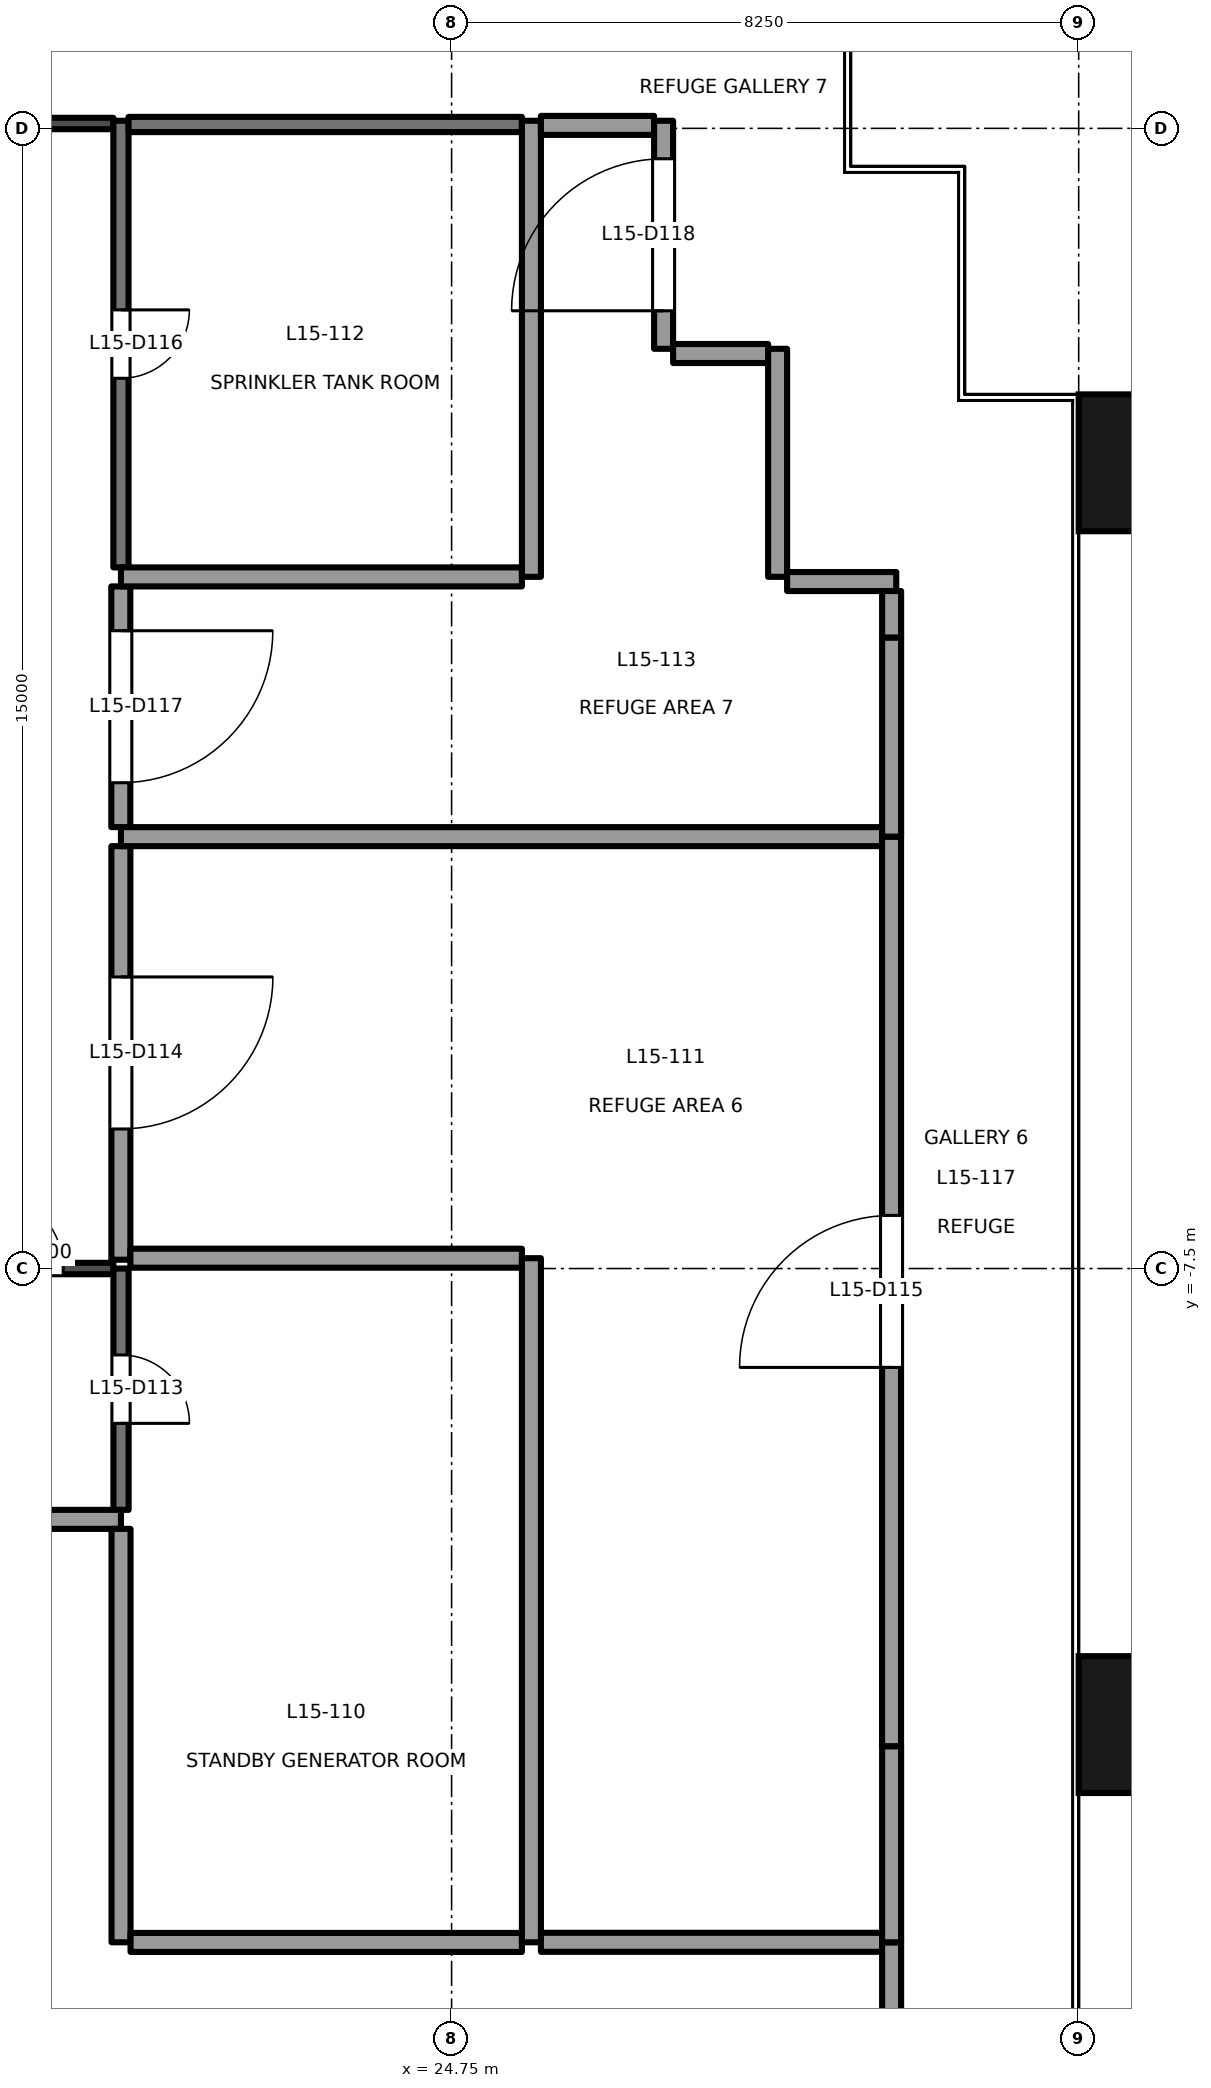
"""IFC4 building model, lengths in metres.
Left out: names, types, materials, properties, quantities, classifications, styles, units other than length and angle.
Written with IfcOpenShell. Run it as: python <this file> out.ifc"""

import sys

from ifc_helpers import new_model, si_unit, direction, frame, frame_2d, origin, origin_2d, place, context, subcontext, project, spatial, rectangle, extrude, element, fill, save


model = new_model("IFC4")
c1 = context("Model", 3, precision=1e-05, world=origin(), true_north=direction((0.0, 1.0)))
c2 = subcontext(c1, "Body", "Model", "MODEL_VIEW")
j1 = project(units=[si_unit("LENGTHUNIT", "METRE"), si_unit("PLANEANGLEUNIT", "RADIAN")], contexts=[c1])
p1 = place(None, origin())
s1 = spatial("IfcSite", under=j1, at=p1, CompositionType="ELEMENT")
p2 = place(p1, origin())
s2 = spatial("IfcBuilding", under=s1, at=p2, CompositionType="ELEMENT")
p3 = place(p2, frame((0.0, 0.0, 69.3)))
s3 = spatial("IfcBuildingStorey", under=s2, at=p3, CompositionType="ELEMENT", Elevation=69.3)
for number, where, z_axis, x_axis in (
    (1, (33.9, -13.5, -0.2), (0.0, 0.0, 1.0), (0.0, 1.0, 0.0)),
    (2, (33.9, 3.1, -0.2), (0.0, 0.0, 1.0), (0.0, 1.0, 0.0)),
):
    element("IfcColumn", number, at=place(p3, frame(where, z_axis=z_axis, x_axis=x_axis)), inside=s3, PredefinedType="COLUMN", context=c2, shape_type="SweptSolid", body=[
        extrude(rectangle(XDim=1.8, YDim=1.8, at=origin_2d()), origin(), (0.0, 0.0, 1.0), 5.0),
    ])
p4 = place(p3, frame((17.98, -7.5, 0.0), z_axis=(0.0, 0.0, 1.0), x_axis=(1.0, 0.0, 0.0)))
e3 = element("IfcWall", 3, at=p4, inside=s3, PredefinedType="PARTITIONING", context=c2, shape_type="SweptSolid", body=[
    extrude(rectangle(XDim=2.32, YDim=0.15, at=frame_2d((1.16, 0.0))), origin(), (0.0, 0.0, 1.0), 2.15),
])
p5 = place(p4, frame((0.66, 0.0, 0.0)))
e4 = element("IfcOpeningElement", 4, at=p5, cuts=e3, PredefinedType="OPENING", context=c2, shape_type="SweptSolid", body=[
    extrude(rectangle(XDim=1.0, YDim=2.1, at=frame_2d((0.5, 1.05))), frame((0.0, 0.085, 0.0), z_axis=(0.0, -1.0, 0.0), x_axis=(1.0, 0.0, 0.0)), (0.0, 0.0, 1.0), 0.171),
])
p6 = place(p3, frame((20.4, -10.8, 0.0), z_axis=(0.0, 0.0, 1.0), x_axis=(-1.0, 0.0, 0.0)))
e5 = element("IfcWall", 5, at=p6, inside=s3, PredefinedType="PARTITIONING", context=c2, shape_type="SweptSolid", body=[
    extrude(rectangle(XDim=17.275, YDim=0.25, at=frame_2d((8.637, 0.0))), origin(), (0.0, 0.0, 1.0), 2.15),
])
p7 = place(p6, frame((7.638, 0.0, 0.0)))
e6 = element("IfcOpeningElement", 6, at=p7, cuts=e5, PredefinedType="OPENING", context=c2, shape_type="SweptSolid", body=[
    extrude(rectangle(XDim=2.0, YDim=2.1, at=frame_2d((1.0, 1.05))), frame((0.0, 0.135, 0.0), z_axis=(0.0, -1.0, 0.0), x_axis=(1.0, 0.0, 0.0)), (0.0, 0.0, 1.0), 0.271),
])
p8 = place(p3, frame((20.401, -7.5, 0.0), z_axis=(0.0, 0.0, 1.0), x_axis=(0.0, -1.0, 0.0)))
e7 = element("IfcWall", 7, at=p8, inside=s3, PredefinedType="PARTITIONING", context=c2, shape_type="SweptSolid", body=[
    extrude(rectangle(XDim=3.175, YDim=0.2, at=frame_2d((1.587, 0.0))), origin(), (0.0, 0.0, 1.0), 4.2),
])
p9 = place(p8, frame((1.137, 0.0, 0.0)))
e8 = element("IfcOpeningElement", 8, at=p9, cuts=e7, PredefinedType="OPENING", context=c2, shape_type="SweptSolid", body=[
    extrude(rectangle(XDim=0.9, YDim=2.1, at=frame_2d((0.45, 1.05))), frame((0.0, 0.111, 0.0), z_axis=(0.0, -1.0, 0.0), x_axis=(1.0, 0.0, 0.0)), (0.0, 0.0, 1.0), 0.221),
])
p10 = place(p3, frame((20.399, -1.943, 0.0), z_axis=(0.0, 0.0, 1.0), x_axis=(0.0, -1.0, 0.0)))
e9 = element("IfcWall", 9, at=p10, inside=s3, PredefinedType="PARTITIONING", context=c2, shape_type="SweptSolid", body=[
    extrude(rectangle(XDim=5.441, YDim=0.25, at=frame_2d((2.72, 0.0))), origin(), (0.0, 0.0, 1.0), 4.2),
])
p11 = place(p10, frame((1.721, 0.0, 0.0)))
e10 = element("IfcOpeningElement", 10, at=p11, cuts=e9, PredefinedType="OPENING", context=c2, shape_type="SweptSolid", body=[
    extrude(rectangle(XDim=2.0, YDim=2.1, at=frame_2d((1.0, 1.05))), frame((0.0, 0.135, 0.0), z_axis=(0.0, -1.0, 0.0), x_axis=(1.0, 0.0, 0.0)), (0.0, 0.0, 1.0), 0.271),
])
p12 = place(p3, frame((20.4, 7.6, 0.0), z_axis=(0.0, 0.0, 1.0), x_axis=(0.0, -1.0, 0.0)))
e11 = element("IfcWall", 11, at=p12, inside=s3, PredefinedType="PARTITIONING", context=c2, shape_type="SweptSolid", body=[
    extrude(rectangle(XDim=5.876, YDim=0.2, at=frame_2d((2.938, 0.0))), origin(), (0.0, 0.0, 1.0), 3.9),
])
p13 = place(p12, frame((2.488, 0.0, 0.0)))
e12 = element("IfcOpeningElement", 12, at=p13, cuts=e11, PredefinedType="OPENING", context=c2, shape_type="SweptSolid", body=[
    extrude(rectangle(XDim=0.9, YDim=2.1, at=frame_2d((0.45, 1.05))), frame((0.0, 0.111, 0.0), z_axis=(0.0, -1.0, 0.0), x_axis=(1.0, 0.0, 0.0)), (0.0, 0.0, 1.0), 0.221),
])
p14 = place(p3, frame((20.398, 1.474, 0.0), z_axis=(0.0, 0.0, 1.0), x_axis=(0.0, -1.0, 0.0)))
e13 = element("IfcWall", 13, at=p14, inside=s3, PredefinedType="PARTITIONING", context=c2, shape_type="SweptSolid", body=[
    extrude(rectangle(XDim=3.167, YDim=0.25, at=frame_2d((1.583, 0.0))), origin(), (0.0, 0.0, 1.0), 4.2),
])
p15 = place(p14, frame((0.583, 0.0, 0.0)))
e14 = element("IfcOpeningElement", 14, at=p15, cuts=e13, PredefinedType="OPENING", context=c2, shape_type="SweptSolid", body=[
    extrude(rectangle(XDim=2.0, YDim=2.1, at=frame_2d((1.0, 1.05))), frame((0.0, 0.135, 0.0), z_axis=(0.0, -1.0, 0.0), x_axis=(1.0, 0.0, 0.0)), (0.0, 0.0, 1.0), 0.271),
])
p16 = place(p3, frame((-17.82, 7.564, 0.0), z_axis=(0.0, 0.0, 1.0), x_axis=(1.0, 0.0, 0.0)))
e15 = element("IfcWall", 15, at=p16, inside=s3, PredefinedType="PARTITIONING", context=c2, shape_type="SweptSolid", body=[
    extrude(rectangle(XDim=38.12, YDim=0.15, at=frame_2d((19.06, 0.0))), origin(), (0.0, 0.0, 1.0), 2.75),
])
p17 = place(p3, frame((20.401, -10.925, 0.0), z_axis=(0.0, 0.0, 1.0), x_axis=(0.0, -1.0, 0.0)))
e16 = element("IfcWall", 16, at=p17, inside=s3, PredefinedType="PARTITIONING", context=c2, shape_type="SweptSolid", body=[
    extrude(rectangle(XDim=5.439, YDim=0.25, at=frame_2d((2.719, 0.0))), origin(), (0.0, 0.0, 1.0), 4.0),
])
p18 = place(p3, frame((20.526, -16.366, 0.0), z_axis=(0.0, 0.0, 1.0), x_axis=(1.0, 0.0, 0.0)))
e17 = element("IfcWall", 17, at=p18, inside=s3, PredefinedType="PARTITIONING", context=c2, shape_type="SweptSolid", body=[
    extrude(rectangle(XDim=5.149, YDim=0.25, at=frame_2d((2.575, 0.0))), origin(), (0.0, 0.0, 1.0), 4.8),
])
p19 = place(p3, frame((25.925, -16.364, 0.0), z_axis=(0.0, 0.0, 1.0), x_axis=(1.0, 0.0, 0.0)))
e18 = element("IfcWall", 18, at=p19, inside=s3, PredefinedType="PARTITIONING", context=c2, shape_type="SweptSolid", body=[
    extrude(rectangle(XDim=4.489, YDim=0.25, at=frame_2d((2.245, 0.0))), origin(), (0.0, 0.0, 1.0), 4.8),
])
p20 = place(p3, frame((30.539, -16.364, 0.0), z_axis=(0.0, 0.0, 1.0), x_axis=(0.0, -1.0, 0.0)))
e19 = element("IfcWall", 19, at=p20, inside=s3, PredefinedType="PARTITIONING", context=c2, shape_type="SweptSolid", body=[
    extrude(rectangle(XDim=9.236, YDim=0.25, at=frame_2d((4.618, 0.0))), origin(), (0.0, 0.0, 1.0), 4.2),
])
p21 = place(p3, frame((20.524, -7.364, 0.0), z_axis=(0.0, 0.0, 1.0), x_axis=(1.0, 0.0, 0.0)))
e20 = element("IfcWall", 20, at=p21, inside=s3, PredefinedType="PARTITIONING", context=c2, shape_type="SweptSolid", body=[
    extrude(rectangle(XDim=5.151, YDim=0.25, at=frame_2d((2.576, 0.0))), origin(), (0.0, 0.0, 1.0), 4.8),
])
p22 = place(p3, frame((25.8, -7.364, 0.0), z_axis=(0.0, 0.0, 1.0), x_axis=(0.0, -1.0, 0.0)))
e21 = element("IfcWall", 21, at=p22, inside=s3, PredefinedType="PARTITIONING", context=c2, shape_type="SweptSolid", body=[
    extrude(rectangle(XDim=9.0, YDim=0.25, at=frame_2d((4.5, 0.0))), origin(), (0.0, 0.0, 1.0), 4.0),
])
p23 = place(p3, frame((20.4, -1.818, 0.0), z_axis=(0.0, 0.0, 1.0), x_axis=(1.0, 0.0, 0.0)))
e22 = element("IfcWall", 22, at=p23, inside=s3, PredefinedType="PARTITIONING", context=c2, shape_type="SweptSolid", body=[
    extrude(rectangle(XDim=10.013, YDim=0.25, at=frame_2d((5.007, 0.0))), origin(), (0.0, 0.0, 1.0), 4.8),
])
p24 = place(p3, frame((30.539, -13.784, 0.0), z_axis=(0.0, 0.0, 1.0), x_axis=(0.0, -1.0, 0.0)))
e23 = element("IfcWall", 23, at=p24, inside=s3, PredefinedType="PARTITIONING", context=c2, shape_type="SweptSolid", body=[
    extrude(rectangle(XDim=2.58, YDim=0.25, at=frame_2d((1.29, 0.0))), origin(), (0.0, 0.0, 1.0), 4.8),
])
p25 = place(p3, frame((30.538, -13.784, 0.0), z_axis=(0.0, 0.0, 1.0), x_axis=(0.0, 1.0, 0.0)))
e24 = element("IfcWall", 24, at=p25, inside=s3, PredefinedType="PARTITIONING", context=c2, shape_type="SweptSolid", body=[
    extrude(rectangle(XDim=11.966, YDim=0.25, at=frame_2d((5.983, 0.0))), origin(), (0.0, 0.0, 1.0), 4.0),
])
p26 = place(p25, frame((4.983, 0.0, 0.0)))
e25 = element("IfcOpeningElement", 25, at=p26, cuts=e24, PredefinedType="OPENING", context=c2, shape_type="SweptSolid", body=[
    extrude(rectangle(XDim=2.0, YDim=2.1, at=frame_2d((1.0, 1.05))), frame((0.0, 0.135, 0.0), z_axis=(0.0, -1.0, 0.0), x_axis=(1.0, 0.0, 0.0)), (0.0, 0.0, 1.0), 0.271),
])
p27 = place(p3, frame((25.675, 1.599, 0.0), z_axis=(0.0, 0.0, 1.0), x_axis=(-1.0, 0.0, 0.0)))
e26 = element("IfcWall", 26, at=p27, inside=s3, PredefinedType="PARTITIONING", context=c2, shape_type="SweptSolid", body=[
    extrude(rectangle(XDim=5.275, YDim=0.25, at=frame_2d((2.638, 0.0))), origin(), (0.0, 0.0, 1.0), 4.8),
])
p28 = place(p3, frame((25.8, 7.6, 0.0), z_axis=(0.0, 0.0, 1.0), x_axis=(0.0, -1.0, 0.0)))
e27 = element("IfcWall", 27, at=p28, inside=s3, PredefinedType="PARTITIONING", context=c2, shape_type="SweptSolid", body=[
    extrude(rectangle(XDim=6.0, YDim=0.25, at=frame_2d((3.0, 0.0))), origin(), (0.0, 0.0, 1.0), 3.9),
])
p29 = place(p3, frame((20.5, 7.551, 0.0), z_axis=(0.0, 0.0, 1.0), x_axis=(1.0, 0.0, 0.0)))
e28 = element("IfcWall", 28, at=p29, inside=s3, PredefinedType="PARTITIONING", context=c2, shape_type="SweptSolid", body=[
    extrude(rectangle(XDim=5.175, YDim=0.2, at=frame_2d((2.587, 0.0))), origin(), (0.0, 0.0, 1.0), 4.8),
])
p30 = place(p3, frame((30.539, 0.802, 0.0), z_axis=(0.0, 0.0, 1.0), x_axis=(0.0, -1.0, 0.0)))
e29 = element("IfcWall", 29, at=p30, inside=s3, PredefinedType="PARTITIONING", context=c2, shape_type="SweptSolid", body=[
    extrude(rectangle(XDim=2.62, YDim=0.25, at=frame_2d((1.31, 0.0))), origin(), (0.0, 0.0, 1.0), 4.2),
])
p31 = place(p3, frame((25.925, 7.539, 0.0), z_axis=(0.0, 0.0, 1.0), x_axis=(1.0, 0.0, 0.0)))
e30 = element("IfcWall", 30, at=p31, inside=s3, PredefinedType="PARTITIONING", context=c2, shape_type="SweptSolid", body=[
    extrude(rectangle(XDim=1.489, YDim=0.25, at=frame_2d((0.745, 0.0))), origin(), (0.0, 0.0, 1.0), 4.8),
])
p32 = place(p3, frame((27.539, 4.6, 0.0), z_axis=(0.0, 0.0, 1.0), x_axis=(0.0, 1.0, 0.0)))
e31 = element("IfcWall", 31, at=p32, inside=s3, PredefinedType="PARTITIONING", context=c2, shape_type="SweptSolid", body=[
    extrude(rectangle(XDim=3.0, YDim=0.25, at=frame_2d((1.5, 0.0))), origin(), (0.0, 0.0, 1.0), 3.9),
])
p33 = place(p32, frame((0.5, 0.0, 0.0)))
e32 = element("IfcOpeningElement", 32, at=p33, cuts=e31, PredefinedType="OPENING", context=c2, shape_type="SweptSolid", body=[
    extrude(rectangle(XDim=2.0, YDim=2.1, at=frame_2d((1.0, 1.05))), frame((0.0, 0.135, 0.0), z_axis=(0.0, -1.0, 0.0), x_axis=(1.0, 0.0, 0.0)), (0.0, 0.0, 1.0), 0.271),
])
p34 = place(p3, frame((27.664, 4.538, 0.0), z_axis=(0.0, 0.0, 1.0), x_axis=(1.0, 0.0, 0.0)))
e33 = element("IfcWall", 33, at=p34, inside=s3, PredefinedType="PARTITIONING", context=c2, shape_type="SweptSolid", body=[
    extrude(rectangle(XDim=1.25, YDim=0.25, at=frame_2d((0.625, 0.0))), origin(), (0.0, 0.0, 1.0), 3.9),
])
p35 = place(p3, frame((29.039, 4.6, 0.0), z_axis=(0.0, 0.0, 1.0), x_axis=(0.0, -1.0, 0.0)))
e34 = element("IfcWall", 34, at=p35, inside=s3, PredefinedType="PARTITIONING", context=c2, shape_type="SweptSolid", body=[
    extrude(rectangle(XDim=3.0, YDim=0.25, at=frame_2d((1.5, 0.0))), origin(), (0.0, 0.0, 1.0), 3.9),
])
p36 = place(p3, frame((29.164, 1.538, 0.0), z_axis=(0.0, 0.0, 1.0), x_axis=(1.0, 0.0, 0.0)))
e35 = element("IfcWall", 35, at=p36, inside=s3, PredefinedType="PARTITIONING", context=c2, shape_type="SweptSolid", body=[
    extrude(rectangle(XDim=1.436, YDim=0.25, at=frame_2d((0.718, 0.0))), origin(), (0.0, 0.0, 1.0), 4.8),
])
p37 = place(p3, frame((30.539, 1.413, 0.0), z_axis=(0.0, 0.0, 1.0), x_axis=(0.0, -1.0, 0.0)))
e36 = element("IfcWall", 36, at=p37, inside=s3, PredefinedType="PARTITIONING", context=c2, shape_type="SweptSolid", body=[
    extrude(rectangle(XDim=0.611, YDim=0.25, at=frame_2d((0.306, 0.0))), origin(), (0.0, 0.0, 1.0), 4.8),
])
p38 = place(p5, origin())
e37 = element("IfcDoor", 37, at=p38, inside=s3, OperationType="SINGLE_SWING_LEFT", PredefinedType="DOOR", context=c2, shape_type="SweptSolid", body=[
    extrude(rectangle(XDim=1.0, YDim=2.1, at=frame_2d((0.5, 1.05))), frame((0.0, 0.025, 0.0), z_axis=(0.0, -1.0, 0.0), x_axis=(1.0, 0.0, 0.0)), (0.0, 0.0, 1.0), 0.05),
])
fill(e4, e37)
p39 = place(p9, origin())
e38 = element("IfcDoor", 38, at=p39, inside=s3, OperationType="SINGLE_SWING_RIGHT", PredefinedType="DOOR", context=c2, shape_type="SweptSolid", body=[
    extrude(rectangle(XDim=0.9, YDim=2.1, at=frame_2d((0.45, 1.05))), frame((0.0, 0.025, 0.0), z_axis=(0.0, -1.0, 0.0), x_axis=(1.0, 0.0, 0.0)), (0.0, 0.0, 1.0), 0.05),
])
fill(e8, e38)
p40 = place(p11, origin())
e39 = element("IfcDoor", 39, at=p40, inside=s3, OperationType="DOUBLE_DOOR_SINGLE_SWING", PredefinedType="DOOR", context=c2, shape_type="SweptSolid", body=[
    extrude(rectangle(XDim=2.0, YDim=2.1, at=frame_2d((1.0, 1.05))), frame((0.0, 0.025, 0.0), z_axis=(0.0, -1.0, 0.0), x_axis=(1.0, 0.0, 0.0)), (0.0, 0.0, 1.0), 0.05),
])
fill(e10, e39)
p41 = place(p26, origin())
e40 = element("IfcDoor", 40, at=p41, inside=s3, OperationType="DOUBLE_DOOR_SINGLE_SWING", PredefinedType="DOOR", context=c2, shape_type="SweptSolid", body=[
    extrude(rectangle(XDim=2.0, YDim=2.1, at=frame_2d((1.0, 1.05))), frame((0.0, 0.025, 0.0), z_axis=(0.0, -1.0, 0.0), x_axis=(1.0, 0.0, 0.0)), (0.0, 0.0, 1.0), 0.05),
])
fill(e25, e40)
p42 = place(p13, origin())
e41 = element("IfcDoor", 41, at=p42, inside=s3, OperationType="SINGLE_SWING_LEFT", PredefinedType="DOOR", context=c2, shape_type="SweptSolid", body=[
    extrude(rectangle(XDim=0.9, YDim=2.1, at=frame_2d((0.45, 1.05))), frame((0.0, 0.025, 0.0), z_axis=(0.0, -1.0, 0.0), x_axis=(1.0, 0.0, 0.0)), (0.0, 0.0, 1.0), 0.05),
])
fill(e12, e41)
p43 = place(p15, origin())
e42 = element("IfcDoor", 42, at=p43, inside=s3, OperationType="DOUBLE_DOOR_SINGLE_SWING", PredefinedType="DOOR", context=c2, shape_type="SweptSolid", body=[
    extrude(rectangle(XDim=2.0, YDim=2.1, at=frame_2d((1.0, 1.05))), frame((0.0, 0.025, 0.0), z_axis=(0.0, -1.0, 0.0), x_axis=(1.0, 0.0, 0.0)), (0.0, 0.0, 1.0), 0.05),
])
fill(e14, e42)
p44 = place(p33, origin())
e43 = element("IfcDoor", 43, at=p44, inside=s3, OperationType="DOUBLE_DOOR_SINGLE_SWING", PredefinedType="DOOR", context=c2, shape_type="SweptSolid", body=[
    extrude(rectangle(XDim=2.0, YDim=2.1, at=frame_2d((1.0, 1.05))), frame((0.0, 0.025, 0.0), z_axis=(0.0, -1.0, 0.0), x_axis=(1.0, 0.0, 0.0)), (0.0, 0.0, 1.0), 0.05),
])
fill(e32, e43)
save(model, sys.argv[1])
